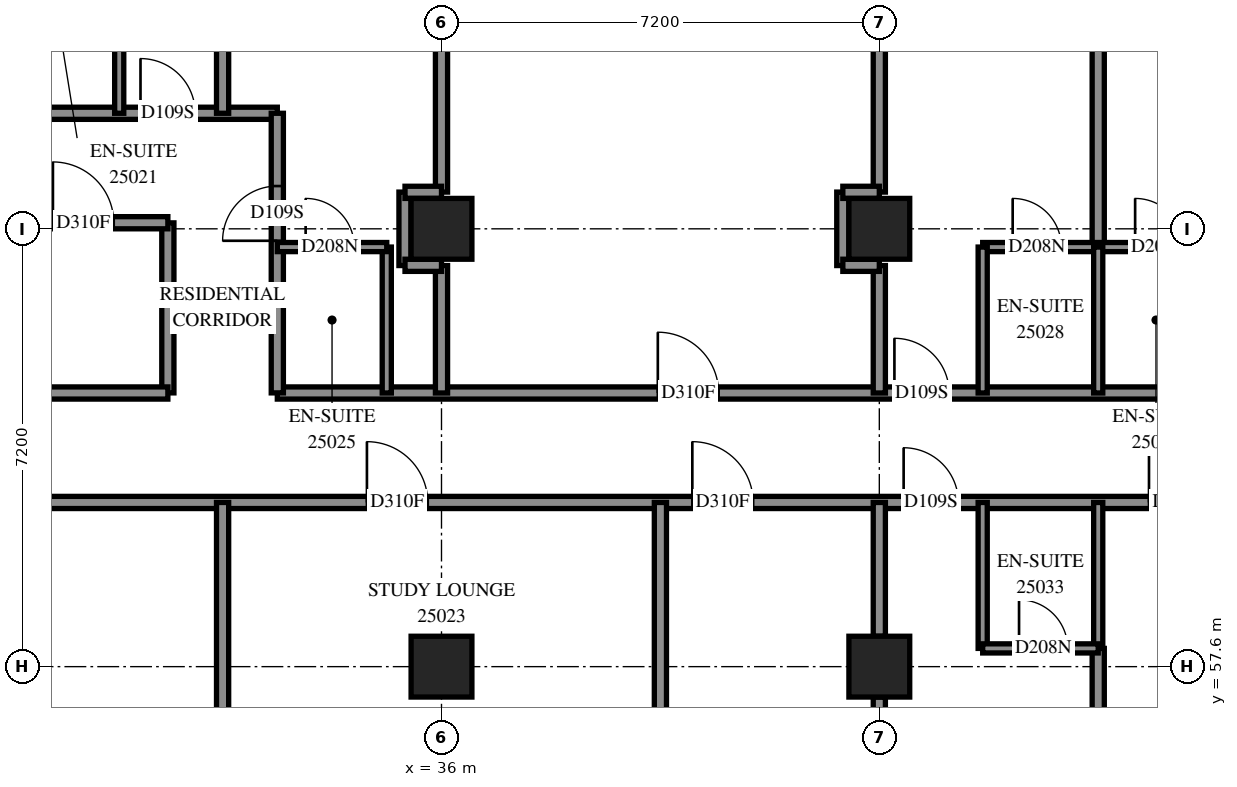
"""IFC4 building model, lengths in metres.
Left out: names, types, materials, properties, quantities, classifications, styles, units other than length and angle.
Written with IfcOpenShell. Run it as: python <this file> out.ifc"""

import sys

from ifc_helpers import new_model, si_unit, direction, frame, frame_2d, origin, origin_2d, place, context, subcontext, project, spatial, rectangle, extrude, element, fill, save


model = new_model("IFC4")
c1 = context("Model", 3, precision=1e-05, world=origin(), true_north=direction((0.0, 1.0)))
c2 = subcontext(c1, "Body", "Model", "MODEL_VIEW")
j1 = project(units=[si_unit("LENGTHUNIT", "METRE"), si_unit("PLANEANGLEUNIT", "RADIAN")], contexts=[c1])
p1 = place(None, origin())
s1 = spatial("IfcSite", under=j1, at=p1, CompositionType="ELEMENT")
p2 = place(p1, origin())
s2 = spatial("IfcBuilding", under=s1, at=p2, CompositionType="ELEMENT")
p3 = place(p2, frame((0.0, 0.0, 94.8)))
s3 = spatial("IfcBuildingStorey", under=s2, at=p3, CompositionType="ELEMENT", Elevation=94.8)
for number, where, z_axis, x_axis in (
    (1, (36.0, 57.6, 0.0), (0.0, 0.0, 1.0), (1.0, 0.0, 0.0)),
    (2, (36.0, 64.8, 0.0), (0.0, 0.0, 1.0), (1.0, 0.0, 0.0)),
    (3, (43.2, 57.6, 0.0), (0.0, 0.0, 1.0), (1.0, 0.0, 0.0)),
    (4, (43.2, 64.8, 0.0), (0.0, 0.0, 1.0), (1.0, 0.0, 0.0)),
):
    element("IfcColumn", number, at=place(p3, frame(where, z_axis=z_axis, x_axis=x_axis)), inside=s3, PredefinedType="COLUMN", context=c2, shape_type="SweptSolid", body=[
        extrude(rectangle(XDim=1.0, YDim=1.0, at=origin_2d()), origin(), (0.0, 0.0, 1.0), 3.1),
    ])
p4 = place(p3, frame((28.802, 60.3, 0.0), z_axis=(0.0, 0.0, 1.0), x_axis=(1.0, 0.0, 0.0)))
e5 = element("IfcWall", 5, at=p4, inside=s3, PredefinedType="PARTITIONING", context=c2, shape_type="SweptSolid", body=[
    extrude(rectangle(XDim=24.298, YDim=0.2, at=frame_2d((12.149, 0.0))), origin(), (0.0, 0.0, 1.0), 3.1),
])
p5 = place(p4, frame((5.972, 0.0, 0.0)))
e6 = element("IfcOpeningElement", 6, at=p5, cuts=e5, PredefinedType="OPENING", context=c2, shape_type="SweptSolid", body=[
    extrude(rectangle(XDim=1.0, YDim=2.1, at=frame_2d((0.5, 1.05))), frame((0.0, 0.11, 0.0), z_axis=(0.0, -1.0, 0.0), x_axis=(1.0, 0.0, 0.0)), (0.0, 0.0, 1.0), 0.22),
])
p6 = place(p4, frame((11.323, 0.0, 0.0)))
e7 = element("IfcOpeningElement", 7, at=p6, cuts=e5, PredefinedType="OPENING", context=c2, shape_type="SweptSolid", body=[
    extrude(rectangle(XDim=1.0, YDim=2.1, at=frame_2d((0.5, 1.05))), frame((0.0, 0.11, 0.0), z_axis=(0.0, -1.0, 0.0), x_axis=(1.0, 0.0, 0.0)), (0.0, 0.0, 1.0), 0.22),
])
p7 = place(p4, frame((14.798, 0.0, 0.0)))
e8 = element("IfcOpeningElement", 8, at=p7, cuts=e5, PredefinedType="OPENING", context=c2, shape_type="SweptSolid", body=[
    extrude(rectangle(XDim=0.9, YDim=2.1, at=frame_2d((0.45, 1.05))), frame((0.0, 0.11, 0.0), z_axis=(0.0, -1.0, 0.0), x_axis=(1.0, 0.0, 0.0)), (0.0, 0.0, 1.0), 0.22),
])
p8 = place(p4, frame((18.833, 0.0, 0.0)))
e9 = element("IfcOpeningElement", 9, at=p8, cuts=e5, PredefinedType="OPENING", context=c2, shape_type="SweptSolid", body=[
    extrude(rectangle(XDim=1.0, YDim=2.1, at=frame_2d((0.5, 1.05))), frame((0.0, 0.11, 0.0), z_axis=(0.0, -1.0, 0.0), x_axis=(1.0, 0.0, 0.0)), (0.0, 0.0, 1.0), 0.22),
])
p9 = place(p4, frame((23.151, 0.0, 0.0)))
e10 = element("IfcOpeningElement", 10, at=p9, cuts=e5, PredefinedType="OPENING", context=c2, shape_type="SweptSolid", body=[
    extrude(rectangle(XDim=1.0, YDim=2.1, at=frame_2d((0.5, 1.05))), frame((0.0, 0.11, 0.0), z_axis=(0.0, -1.0, 0.0), x_axis=(1.0, 0.0, 0.0)), (0.0, 0.0, 1.0), 0.22),
])
p10 = place(p3, frame((33.3, 62.1, 0.0), z_axis=(0.0, 0.0, 1.0), x_axis=(1.0, 0.0, 0.0)))
e11 = element("IfcWall", 11, at=p10, inside=s3, PredefinedType="PARTITIONING", context=c2, shape_type="SweptSolid", body=[
    extrude(rectangle(XDim=17.1, YDim=0.2, at=frame_2d((8.55, 0.0))), origin(), (0.0, 0.0, 1.0), 3.1),
])
p11 = place(p10, frame((6.258, 0.0, 0.0)))
e12 = element("IfcOpeningElement", 12, at=p11, cuts=e11, PredefinedType="OPENING", context=c2, shape_type="SweptSolid", body=[
    extrude(rectangle(XDim=1.0, YDim=2.1, at=frame_2d((0.5, 1.05))), frame((0.0, 0.11, 0.0), z_axis=(0.0, -1.0, 0.0), x_axis=(1.0, 0.0, 0.0)), (0.0, 0.0, 1.0), 0.22),
])
p12 = place(p10, frame((10.148, 0.0, 0.0)))
e13 = element("IfcOpeningElement", 13, at=p12, cuts=e11, PredefinedType="OPENING", context=c2, shape_type="SweptSolid", body=[
    extrude(rectangle(XDim=0.9, YDim=2.1, at=frame_2d((0.45, 1.05))), frame((0.0, 0.11, 0.0), z_axis=(0.0, -1.0, 0.0), x_axis=(1.0, 0.0, 0.0)), (0.0, 0.0, 1.0), 0.22),
])
p13 = place(p10, frame((15.729, 0.0, 0.0)))
e14 = element("IfcOpeningElement", 14, at=p13, cuts=e11, PredefinedType="OPENING", context=c2, shape_type="SweptSolid", body=[
    extrude(rectangle(XDim=0.9, YDim=2.1, at=frame_2d((0.45, 1.05))), frame((0.0, 0.11, 0.0), z_axis=(0.0, -1.0, 0.0), x_axis=(1.0, 0.0, 0.0)), (0.0, 0.0, 1.0), 0.22),
])
p14 = place(p3, frame((21.602, 66.7, 0.0), z_axis=(0.0, 0.0, 1.0), x_axis=(1.0, 0.0, 0.0)))
e15 = element("IfcWall", 15, at=p14, inside=s3, PredefinedType="PARTITIONING", context=c2, shape_type="SweptSolid", body=[
    extrude(rectangle(XDim=11.698, YDim=0.2, at=frame_2d((5.849, 0.0))), origin(), (0.0, 0.0, 1.0), 3.1),
])
p15 = place(p14, frame((1.79, 0.0, 0.0)))
e16 = element("IfcOpeningElement", 16, at=p15, cuts=e15, PredefinedType="OPENING", context=c2, shape_type="SweptSolid", body=[
    extrude(rectangle(XDim=1.0, YDim=2.1, at=frame_2d((0.5, 1.05))), frame((0.0, 0.11, 0.0), z_axis=(0.0, -1.0, 0.0), x_axis=(1.0, 0.0, 0.0)), (0.0, 0.0, 1.0), 0.22),
])
p16 = place(p14, frame((3.998, 0.0, 0.0)))
e17 = element("IfcOpeningElement", 17, at=p16, cuts=e15, PredefinedType="OPENING", context=c2, shape_type="SweptSolid", body=[
    extrude(rectangle(XDim=0.9, YDim=2.1, at=frame_2d((0.45, 1.05))), frame((0.0, 0.11, 0.0), z_axis=(0.0, -1.0, 0.0), x_axis=(1.0, 0.0, 0.0)), (0.0, 0.0, 1.0), 0.22),
])
p17 = place(p14, frame((9.448, 0.0, 0.0)))
e18 = element("IfcOpeningElement", 18, at=p17, cuts=e15, PredefinedType="OPENING", context=c2, shape_type="SweptSolid", body=[
    extrude(rectangle(XDim=0.9, YDim=2.1, at=frame_2d((0.45, 1.05))), frame((0.0, 0.11, 0.0), z_axis=(0.0, -1.0, 0.0), x_axis=(1.0, 0.0, 0.0)), (0.0, 0.0, 1.0), 0.22),
])
p18 = place(p3, frame((46.8, 64.5, 0.0), z_axis=(0.0, 0.0, 1.0), x_axis=(0.0, 1.0, 0.0)))
e19 = element("IfcWall", 19, at=p18, inside=s3, PredefinedType="PARTITIONING", context=c2, shape_type="SweptSolid", body=[
    extrude(rectangle(XDim=8.241, YDim=0.2, at=frame_2d((4.12, 0.0))), origin(), (0.0, 0.0, 1.0), 3.1),
])
p19 = place(p3, frame((46.8, 49.75, 0.0), z_axis=(0.0, 0.0, 1.0), x_axis=(0.0, 1.0, 0.0)))
e20 = element("IfcWall", 20, at=p19, inside=s3, PredefinedType="PARTITIONING", context=c2, shape_type="SweptSolid", body=[
    extrude(rectangle(XDim=8.15, YDim=0.2, at=frame_2d((4.075, 0.0))), origin(), (0.0, 0.0, 1.0), 3.1),
])
p20 = place(p3, frame((43.2, 50.9, 0.0), z_axis=(0.0, 0.0, 1.0), x_axis=(0.0, 1.0, 0.0)))
e21 = element("IfcWall", 21, at=p20, inside=s3, PredefinedType="PARTITIONING", context=c2, shape_type="SweptSolid", body=[
    extrude(rectangle(XDim=6.2, YDim=0.2, at=frame_2d((3.1, 0.0))), origin(), (0.0, 0.0, 1.0), 2.6),
])
p21 = place(p3, frame((32.4, 66.7, 0.0), z_axis=(0.0, 0.0, 1.0), x_axis=(0.0, 1.0, 0.0)))
e22 = element("IfcWall", 22, at=p21, inside=s3, PredefinedType="PARTITIONING", context=c2, shape_type="SweptSolid", body=[
    extrude(rectangle(XDim=6.128, YDim=0.2, at=frame_2d((3.064, 0.0))), origin(), (0.0, 0.0, 1.0), 3.1),
])
for number, where, z_axis, x_axis in (
    (23, (36.0, 65.404, 0.0), (0.0, 0.0, 1.0), (0.0, 1.0, 0.0)),
    (24, (43.2, 65.404, 0.0), (0.0, 0.0, 1.0), (0.0, 1.0, 0.0)),
):
    element("IfcWall", number, at=place(p3, frame(where, z_axis=z_axis, x_axis=x_axis)), inside=s3, PredefinedType="PARTITIONING", context=c2, shape_type="SweptSolid", body=[
        extrude(rectangle(XDim=5.992, YDim=0.2, at=frame_2d((2.996, 0.0))), origin(), (0.0, 0.0, 1.0), 3.1),
    ])
p22 = place(p3, frame((33.3, 62.102, 0.0), z_axis=(0.0, 0.0, 1.0), x_axis=(0.0, 1.0, 0.0)))
e25 = element("IfcWall", 25, at=p22, inside=s3, PredefinedType="PARTITIONING", context=c2, shape_type="SweptSolid", body=[
    extrude(rectangle(XDim=4.598, YDim=0.2, at=frame_2d((2.299, 0.0))), origin(), (0.0, 0.0, 1.0), 3.1),
])
p23 = place(p22, frame((2.501, 0.0, 0.0)))
e26 = element("IfcOpeningElement", 26, at=p23, cuts=e25, PredefinedType="OPENING", context=c2, shape_type="SweptSolid", body=[
    extrude(rectangle(XDim=0.9, YDim=2.1, at=frame_2d((0.45, 1.05))), frame((0.0, 0.11, 0.0), z_axis=(0.0, -1.0, 0.0), x_axis=(1.0, 0.0, 0.0)), (0.0, 0.0, 1.0), 0.22),
])
for number, where, z_axis, x_axis in (
    (27, (32.4, 55.929, 0.0), (0.0, 0.0, 1.0), (0.0, 1.0, 0.0)),
    (28, (39.6, 55.929, 0.0), (0.0, 0.0, 1.0), (0.0, 1.0, 0.0)),
):
    element("IfcWall", number, at=place(p3, frame(where, z_axis=z_axis, x_axis=x_axis)), inside=s3, PredefinedType="PARTITIONING", context=c2, shape_type="SweptSolid", body=[
        extrude(rectangle(XDim=4.371, YDim=0.2, at=frame_2d((2.186, 0.0))), origin(), (0.0, 0.0, 1.0), 3.1),
    ])
p24 = place(p3, frame((44.9, 64.5, 0.0), z_axis=(0.0, 0.0, 1.0), x_axis=(1.0, 0.0, 0.0)))
e29 = element("IfcWall", 29, at=p24, inside=s3, PredefinedType="PARTITIONING", context=c2, shape_type="SweptSolid", body=[
    extrude(rectangle(XDim=3.8, YDim=0.15, at=frame_2d((1.9, 0.0))), origin(), (0.0, 0.0, 1.0), 3.1),
])
p25 = place(p24, frame((0.493, 0.0, 0.0)))
e30 = element("IfcOpeningElement", 30, at=p25, cuts=e29, PredefinedType="OPENING", context=c2, shape_type="SweptSolid", body=[
    extrude(rectangle(XDim=0.8, YDim=2.1, at=frame_2d((0.4, 1.05))), frame((0.0, 0.085, 0.0), z_axis=(0.0, -1.0, 0.0), x_axis=(1.0, 0.0, 0.0)), (0.0, 0.0, 1.0), 0.17),
])
p26 = place(p24, frame((2.507, 0.0, 0.0)))
e31 = element("IfcOpeningElement", 31, at=p26, cuts=e29, PredefinedType="OPENING", context=c2, shape_type="SweptSolid", body=[
    extrude(rectangle(XDim=0.8, YDim=2.1, at=frame_2d((0.4, 1.05))), frame((0.0, 0.085, 0.0), z_axis=(0.0, -1.0, 0.0), x_axis=(1.0, 0.0, 0.0)), (0.0, 0.0, 1.0), 0.17),
])
p27 = place(p3, frame((31.5, 62.102, 0.0), z_axis=(0.0, 0.0, 1.0), x_axis=(0.0, 1.0, 0.0)))
e32 = element("IfcWall", 32, at=p27, inside=s3, PredefinedType="PARTITIONING", context=c2, shape_type="SweptSolid", body=[
    extrude(rectangle(XDim=2.796, YDim=0.2, at=frame_2d((1.398, 0.0))), origin(), (0.0, 0.0, 1.0), 3.1),
])
p28 = place(p3, frame((28.802, 62.1, 0.0), z_axis=(0.0, 0.0, 1.0), x_axis=(1.0, 0.0, 0.0)))
e33 = element("IfcWall", 33, at=p28, inside=s3, PredefinedType="PARTITIONING", context=c2, shape_type="SweptSolid", body=[
    extrude(rectangle(XDim=2.698, YDim=0.2, at=frame_2d((1.349, 0.0))), origin(), (0.0, 0.0, 1.0), 3.1),
])
for number, where, z_axis, x_axis in (
    (34, (35.1, 62.1, 0.0), (0.0, 0.0, 1.0), (0.0, 1.0, 0.0)),
    (35, (44.9, 57.9, 0.0), (0.0, 0.0, 1.0), (0.0, 1.0, 0.0)),
    (36, (44.9, 62.1, 0.0), (0.0, 0.0, 1.0), (0.0, 1.0, 0.0)),
    (37, (46.8, 57.9, 0.0), (0.0, 0.0, 1.0), (0.0, 1.0, 0.0)),
    (38, (46.8, 62.1, 0.0), (0.0, 0.0, 1.0), (0.0, 1.0, 0.0)),
    (39, (30.7, 66.7, 0.0), (0.0, 0.0, 1.0), (0.0, 1.0, 0.0)),
):
    element("IfcWall", number, at=place(p3, frame(where, z_axis=z_axis, x_axis=x_axis)), inside=s3, PredefinedType="PARTITIONING", context=c2, shape_type="SweptSolid", body=[
        extrude(rectangle(XDim=2.4, YDim=0.15, at=frame_2d((1.2, 0.0))), origin(), (0.0, 0.0, 1.0), 3.1),
    ])
p29 = place(p3, frame((29.3, 64.9, 0.0), z_axis=(0.0, 0.0, 1.0), x_axis=(1.0, 0.0, 0.0)))
e40 = element("IfcWall", 40, at=p29, inside=s3, PredefinedType="PARTITIONING", context=c2, shape_type="SweptSolid", body=[
    extrude(rectangle(XDim=2.2, YDim=0.2, at=frame_2d((1.1, 0.0))), origin(), (0.0, 0.0, 1.0), 3.1),
])
p30 = place(p29, frame((0.31, 0.0, 0.0)))
e41 = element("IfcOpeningElement", 41, at=p30, cuts=e40, PredefinedType="OPENING", context=c2, shape_type="SweptSolid", body=[
    extrude(rectangle(XDim=1.0, YDim=2.1, at=frame_2d((0.5, 1.05))), frame((0.0, 0.11, 0.0), z_axis=(0.0, -1.0, 0.0), x_axis=(1.0, 0.0, 0.0)), (0.0, 0.0, 1.0), 0.22),
])
p31 = place(p3, frame((43.2, 58.1, 0.0), z_axis=(0.0, 0.0, 1.0), x_axis=(0.0, 1.0, 0.0)))
e42 = element("IfcWall", 42, at=p31, inside=s3, PredefinedType="PARTITIONING", context=c2, shape_type="SweptSolid", body=[
    extrude(rectangle(XDim=2.2, YDim=0.2, at=frame_2d((1.1, 0.0))), origin(), (0.0, 0.0, 1.0), 3.1),
])
for number, where, z_axis, x_axis in (
    (43, (36.0, 62.1, 0.0), (0.0, 0.0, 1.0), (0.0, 1.0, 0.0)),
    (44, (43.2, 62.1, 0.0), (0.0, 0.0, 1.0), (0.0, 1.0, 0.0)),
):
    element("IfcWall", number, at=place(p3, frame(where, z_axis=z_axis, x_axis=x_axis)), inside=s3, PredefinedType="PARTITIONING", context=c2, shape_type="SweptSolid", body=[
        extrude(rectangle(XDim=2.096, YDim=0.2, at=frame_2d((1.048, 0.0))), origin(), (0.0, 0.0, 1.0), 3.1),
    ])
p32 = place(p3, frame((44.9, 57.9, 0.0), z_axis=(0.0, 0.0, 1.0), x_axis=(1.0, 0.0, 0.0)))
e45 = element("IfcWall", 45, at=p32, inside=s3, PredefinedType="PARTITIONING", context=c2, shape_type="SweptSolid", body=[
    extrude(rectangle(XDim=1.9, YDim=0.15, at=frame_2d((0.95, 0.0))), origin(), (0.0, 0.0, 1.0), 3.1),
])
p33 = place(p32, frame((0.598, 0.0, 0.0)))
e46 = element("IfcOpeningElement", 46, at=p33, cuts=e45, PredefinedType="OPENING", context=c2, shape_type="SweptSolid", body=[
    extrude(rectangle(XDim=0.8, YDim=2.1, at=frame_2d((0.4, 1.05))), frame((0.0, 0.085, 0.0), z_axis=(0.0, -1.0, 0.0), x_axis=(1.0, 0.0, 0.0)), (0.0, 0.0, 1.0), 0.17),
])
p34 = place(p3, frame((33.3, 64.5, 0.0), z_axis=(0.0, 0.0, 1.0), x_axis=(1.0, 0.0, 0.0)))
e47 = element("IfcWall", 47, at=p34, inside=s3, PredefinedType="PARTITIONING", context=c2, shape_type="SweptSolid", body=[
    extrude(rectangle(XDim=1.8, YDim=0.15, at=frame_2d((0.9, 0.0))), origin(), (0.0, 0.0, 1.0), 3.1),
])
p35 = place(p34, frame((0.466, 0.0, 0.0)))
e48 = element("IfcOpeningElement", 48, at=p35, cuts=e47, PredefinedType="OPENING", context=c2, shape_type="SweptSolid", body=[
    extrude(rectangle(XDim=0.8, YDim=2.1, at=frame_2d((0.4, 1.05))), frame((0.0, 0.085, 0.0), z_axis=(0.0, -1.0, 0.0), x_axis=(1.0, 0.0, 0.0)), (0.0, 0.0, 1.0), 0.17),
])
for number, where, z_axis, x_axis in (
    (49, (35.4, 64.196, 0.0), (0.0, 0.0, 1.0), (0.0, 1.0, 0.0)),
    (50, (42.6, 64.196, 0.0), (0.0, 0.0, 1.0), (0.0, 1.0, 0.0)),
):
    element("IfcWall", number, at=place(p3, frame(where, z_axis=z_axis, x_axis=x_axis)), inside=s3, PredefinedType="PARTITIONING", context=c2, shape_type="SweptSolid", body=[
        extrude(rectangle(XDim=1.208, YDim=0.2, at=frame_2d((0.604, 0.0))), origin(), (0.0, 0.0, 1.0), 3.1),
    ])
for number, where, z_axis, x_axis in (
    (51, (35.4, 65.4, 0.0), (0.0, 0.0, 1.0), (1.0, 0.0, 0.0)),
    (52, (42.6, 65.4, 0.0), (0.0, 0.0, 1.0), (1.0, 0.0, 0.0)),
    (53, (35.4, 64.2, 0.0), (0.0, 0.0, 1.0), (1.0, 0.0, 0.0)),
    (54, (42.6, 64.2, 0.0), (0.0, 0.0, 1.0), (1.0, 0.0, 0.0)),
):
    element("IfcWall", number, at=place(p3, frame(where, z_axis=z_axis, x_axis=x_axis)), inside=s3, PredefinedType="PARTITIONING", context=c2, shape_type="SweptSolid", body=[
        extrude(rectangle(XDim=0.6, YDim=0.2, at=frame_2d((0.3, 0.0))), origin(), (0.0, 0.0, 1.0), 3.1),
    ])
p36 = place(p17, origin())
e55 = element("IfcDoor", 55, at=p36, inside=s3, OperationType="SINGLE_SWING_RIGHT", PredefinedType="DOOR", context=c2, shape_type="SweptSolid", body=[
    extrude(rectangle(XDim=0.9, YDim=2.1, at=frame_2d((0.45, 1.05))), frame((0.0, 0.025, 0.0), z_axis=(0.0, -1.0, 0.0), x_axis=(1.0, 0.0, 0.0)), (0.0, 0.0, 1.0), 0.05),
])
fill(e18, e55)
p37 = place(p30, origin())
e56 = element("IfcDoor", 56, at=p37, inside=s3, OperationType="SINGLE_SWING_RIGHT", PredefinedType="DOOR", context=c2, shape_type="SweptSolid", body=[
    extrude(rectangle(XDim=1.0, YDim=2.1, at=frame_2d((0.5, 1.05))), frame((0.0, 0.025, 0.0), z_axis=(0.0, -1.0, 0.0), x_axis=(1.0, 0.0, 0.0)), (0.0, 0.0, 1.0), 0.05),
])
fill(e41, e56)
p38 = place(p5, origin())
e57 = element("IfcDoor", 57, at=p38, inside=s3, OperationType="SINGLE_SWING_RIGHT", PredefinedType="DOOR", context=c2, shape_type="SweptSolid", body=[
    extrude(rectangle(XDim=1.0, YDim=2.1, at=frame_2d((0.5, 1.05))), frame((0.0, 0.025, 0.0), z_axis=(0.0, -1.0, 0.0), x_axis=(1.0, 0.0, 0.0)), (0.0, 0.0, 1.0), 0.05),
])
fill(e6, e57)
p39 = place(p23, origin())
e58 = element("IfcDoor", 58, at=p39, inside=s3, OperationType="SINGLE_SWING_LEFT", PredefinedType="DOOR", context=c2, shape_type="SweptSolid", body=[
    extrude(rectangle(XDim=0.9, YDim=2.1, at=frame_2d((0.45, 1.05))), frame((0.0, 0.025, 0.0), z_axis=(0.0, -1.0, 0.0), x_axis=(1.0, 0.0, 0.0)), (0.0, 0.0, 1.0), 0.05),
])
fill(e26, e58)
p40 = place(p35, origin())
e59 = element("IfcDoor", 59, at=p40, inside=s3, OperationType="SINGLE_SWING_RIGHT", PredefinedType="DOOR", context=c2, shape_type="SweptSolid", body=[
    extrude(rectangle(XDim=0.8, YDim=2.1, at=frame_2d((0.4, 1.05))), frame((0.0, 0.025, 0.0), z_axis=(0.0, -1.0, 0.0), x_axis=(1.0, 0.0, 0.0)), (0.0, 0.0, 1.0), 0.05),
])
fill(e48, e59)
p41 = place(p11, origin())
e60 = element("IfcDoor", 60, at=p41, inside=s3, OperationType="SINGLE_SWING_RIGHT", PredefinedType="DOOR", context=c2, shape_type="SweptSolid", body=[
    extrude(rectangle(XDim=1.0, YDim=2.1, at=frame_2d((0.5, 1.05))), frame((0.0, 0.025, 0.0), z_axis=(0.0, -1.0, 0.0), x_axis=(1.0, 0.0, 0.0)), (0.0, 0.0, 1.0), 0.05),
])
fill(e12, e60)
p42 = place(p12, origin())
e61 = element("IfcDoor", 61, at=p42, inside=s3, OperationType="SINGLE_SWING_RIGHT", PredefinedType="DOOR", context=c2, shape_type="SweptSolid", body=[
    extrude(rectangle(XDim=0.9, YDim=2.1, at=frame_2d((0.45, 1.05))), frame((0.0, 0.025, 0.0), z_axis=(0.0, -1.0, 0.0), x_axis=(1.0, 0.0, 0.0)), (0.0, 0.0, 1.0), 0.05),
])
fill(e13, e61)
p43 = place(p25, origin())
e62 = element("IfcDoor", 62, at=p43, inside=s3, OperationType="SINGLE_SWING_RIGHT", PredefinedType="DOOR", context=c2, shape_type="SweptSolid", body=[
    extrude(rectangle(XDim=0.8, YDim=2.1, at=frame_2d((0.4, 1.05))), frame((0.0, 0.025, 0.0), z_axis=(0.0, -1.0, 0.0), x_axis=(1.0, 0.0, 0.0)), (0.0, 0.0, 1.0), 0.05),
])
fill(e30, e62)
p44 = place(p26, origin())
e63 = element("IfcDoor", 63, at=p44, inside=s3, OperationType="SINGLE_SWING_RIGHT", PredefinedType="DOOR", context=c2, shape_type="SweptSolid", body=[
    extrude(rectangle(XDim=0.8, YDim=2.1, at=frame_2d((0.4, 1.05))), frame((0.0, 0.025, 0.0), z_axis=(0.0, -1.0, 0.0), x_axis=(1.0, 0.0, 0.0)), (0.0, 0.0, 1.0), 0.05),
])
fill(e31, e63)
p45 = place(p6, origin())
e64 = element("IfcDoor", 64, at=p45, inside=s3, OperationType="SINGLE_SWING_RIGHT", PredefinedType="DOOR", context=c2, shape_type="SweptSolid", body=[
    extrude(rectangle(XDim=1.0, YDim=2.1, at=frame_2d((0.5, 1.05))), frame((0.0, 0.025, 0.0), z_axis=(0.0, -1.0, 0.0), x_axis=(1.0, 0.0, 0.0)), (0.0, 0.0, 1.0), 0.05),
])
fill(e7, e64)
p46 = place(p7, origin())
e65 = element("IfcDoor", 65, at=p46, inside=s3, OperationType="SINGLE_SWING_LEFT", PredefinedType="DOOR", context=c2, shape_type="SweptSolid", body=[
    extrude(rectangle(XDim=0.9, YDim=2.1, at=frame_2d((0.45, 1.05))), frame((0.0, 0.025, 0.0), z_axis=(0.0, -1.0, 0.0), x_axis=(1.0, 0.0, 0.0)), (0.0, 0.0, 1.0), 0.05),
])
fill(e8, e65)
p47 = place(p33, origin())
e66 = element("IfcDoor", 66, at=p47, inside=s3, OperationType="SINGLE_SWING_RIGHT", PredefinedType="DOOR", context=c2, shape_type="SweptSolid", body=[
    extrude(rectangle(XDim=0.8, YDim=2.1, at=frame_2d((0.4, 1.05))), frame((0.0, 0.025, 0.0), z_axis=(0.0, -1.0, 0.0), x_axis=(1.0, 0.0, 0.0)), (0.0, 0.0, 1.0), 0.05),
])
fill(e46, e66)
p48 = place(p8, origin())
e67 = element("IfcDoor", 67, at=p48, inside=s3, OperationType="SINGLE_SWING_RIGHT", PredefinedType="DOOR", context=c2, shape_type="SweptSolid", body=[
    extrude(rectangle(XDim=1.0, YDim=2.1, at=frame_2d((0.5, 1.05))), frame((0.0, 0.025, 0.0), z_axis=(0.0, -1.0, 0.0), x_axis=(1.0, 0.0, 0.0)), (0.0, 0.0, 1.0), 0.05),
])
fill(e9, e67)
save(model, sys.argv[1])
